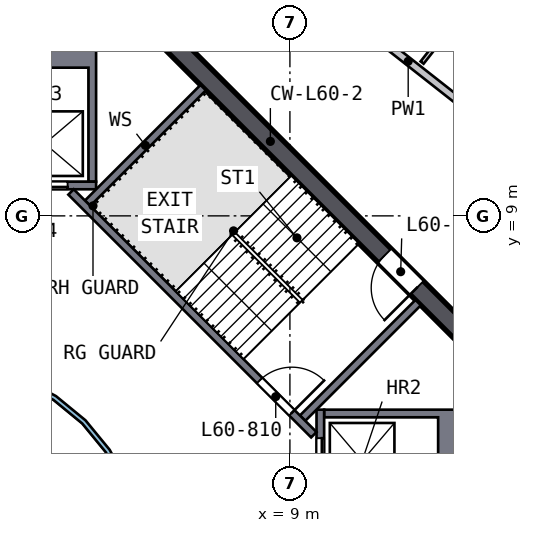
"""IFC4 building model, lengths in metres.
Left out: names, types, materials, properties, quantities, classifications, styles, units other than length and angle.
Written with IfcOpenShell. Run it as: python <this file> out.ifc"""

import sys

from ifc_helpers import new_model, si_unit, direction, frame, frame_2d, origin, place, context, subcontext, project, spatial, polyline, rectangle, outline, extrude, element, fill, save


model = new_model("IFC4")
c1 = context("Model", 3, precision=1e-05, world=origin(), true_north=direction((0.0, 1.0)))
c2 = subcontext(c1, "Body", "Model", "MODEL_VIEW")
j1 = project(units=[si_unit("LENGTHUNIT", "METRE"), si_unit("PLANEANGLEUNIT", "RADIAN")], contexts=[c1])
p1 = place(None, origin())
s1 = spatial("IfcSite", under=j1, at=p1, CompositionType="ELEMENT")
p2 = place(p1, origin())
s2 = spatial("IfcBuilding", under=s1, at=p2, CompositionType="ELEMENT")
p3 = place(p2, frame((0.0, 0.0, 244.5)))
s3 = spatial("IfcBuildingStorey", under=s2, at=p3, CompositionType="ELEMENT", Elevation=244.5)
p4 = place(p3, frame((13.823, 5.622, 0.0), z_axis=(0.0, 0.0, 1.0), x_axis=(-0.707106781, 0.707106781, 0.0)))
e1 = element("IfcWall", 1, at=p4, inside=s3, PredefinedType="SHEAR", context=c2, shape_type="SweptSolid", body=[
    extrude(rectangle(XDim=11.598, YDim=0.5, at=frame_2d((5.799, 0.0))), origin(), (0.0, 0.0, 1.0), 3.5),
])
p5 = place(p4, frame((2.099, 0.0, 0.0)))
e2 = element("IfcOpeningElement", 2, at=p5, cuts=e1, PredefinedType="OPENING", context=c2, shape_type="SweptSolid", body=[
    extrude(rectangle(XDim=1.2, YDim=2.1, at=frame_2d((0.6, 1.05))), frame((0.0, 0.26, 0.0), z_axis=(0.0, -1.0, 0.0), x_axis=(1.0, 0.0, 0.0)), (0.0, 0.0, 1.0), 0.52),
])
p6 = place(p3, origin())
e3 = element("IfcWall", 3, at=p6, inside=s3, PredefinedType="SOLIDWALL", context=c2, shape_type="SweptSolid", body=[
    extrude(outline(polyline([(13.5, 3.9), (13.5, 1.2), (9.9, 1.2), (9.9, 1.4), (12.9, 1.4), (12.9, 3.7), (9.9, 3.7), (9.9, 3.9), (13.5, 3.9)])), origin(), (0.0, 0.0, 1.0), 3.19),
])
p7 = place(p3, frame((9.8, 1.2, 0.0), z_axis=(0.0, 0.0, 1.0), x_axis=(0.0, 1.0, 0.0)))
e4 = element("IfcWall", 4, at=p7, inside=s3, PredefinedType="SOLIDWALL", context=c2, shape_type="SweptSolid", body=[
    extrude(rectangle(XDim=2.7, YDim=0.2, at=frame_2d((1.35, 0.0))), origin(), (0.0, 0.0, 1.0), 3.19),
])
p8 = place(p7, frame((0.75, 0.0, 0.0)))
e5 = element("IfcOpeningElement", 5, at=p8, cuts=e4, PredefinedType="OPENING", context=c2, shape_type="SweptSolid", body=[
    extrude(rectangle(XDim=1.2, YDim=2.1, at=frame_2d((0.6, 1.05))), frame((0.0, 0.11, 0.0), z_axis=(0.0, -1.0, 0.0), x_axis=(1.0, 0.0, 0.0)), (0.0, 0.0, 1.0), 0.22),
])
p9 = place(p3, origin())
e6 = element("IfcWall", 6, at=p9, inside=s3, PredefinedType="SOLIDWALL", context=c2, shape_type="SweptSolid", body=[
    extrude(outline(polyline([(3.9, 9.9), (3.7, 9.9), (3.7, 12.9), (1.4, 12.9), (1.4, 9.9), (1.2, 9.9), (1.2, 13.5), (3.9, 13.5), (3.9, 9.9)])), origin(), (0.0, 0.0, 1.0), 3.19),
])
p10 = place(p3, frame((1.2, 9.8, 0.0), z_axis=(0.0, 0.0, 1.0), x_axis=(1.0, 0.0, 0.0)))
e7 = element("IfcWall", 7, at=p10, inside=s3, PredefinedType="SOLIDWALL", context=c2, shape_type="SweptSolid", body=[
    extrude(rectangle(XDim=2.7, YDim=0.2, at=frame_2d((1.35, 0.0))), origin(), (0.0, 0.0, 1.0), 3.19),
])
p11 = place(p10, frame((0.75, 0.0, 0.0)))
e8 = element("IfcOpeningElement", 8, at=p11, cuts=e7, PredefinedType="OPENING", context=c2, shape_type="SweptSolid", body=[
    extrude(rectangle(XDim=1.2, YDim=2.1, at=frame_2d((0.6, 1.05))), frame((0.0, 0.11, 0.0), z_axis=(0.0, -1.0, 0.0), x_axis=(1.0, 0.0, 0.0)), (0.0, 0.0, 1.0), 0.22),
])
p12 = place(p3, frame((3.24, 9.629, 0.0), z_axis=(0.0, 0.0, 1.0), x_axis=(0.707106781, -0.707106781, 0.0)))
e9 = element("IfcWall", 9, at=p12, inside=s3, PredefinedType="SOLIDWALL", context=c2, shape_type="SweptSolid", body=[
    extrude(rectangle(XDim=9.036, YDim=0.2, at=frame_2d((4.518, 0.0))), origin(), (0.0, 0.0, 1.0), 3.19),
])
p13 = place(p12, frame((7.018, 0.0, 0.0)))
e10 = element("IfcOpeningElement", 10, at=p13, cuts=e9, PredefinedType="OPENING", context=c2, shape_type="SweptSolid", body=[
    extrude(rectangle(XDim=1.2, YDim=2.1, at=frame_2d((0.6, 1.05))), frame((0.0, 0.11, 0.0), z_axis=(0.0, -1.0, 0.0), x_axis=(1.0, 0.0, 0.0)), (0.0, 0.0, 1.0), 0.22),
])
for number, where, z_axis, x_axis in (
    (11, (9.334, 3.677, 0.0), (0.0, 0.0, 1.0), (0.707, 0.707, 0.0)),
    (12, (3.677, 9.334, 0.0), (0.0, 0.0, 1.0), (0.707, 0.707, 0.0)),
):
    element("IfcWall", number, at=place(p3, frame(where, z_axis=z_axis, x_axis=x_axis)), inside=s3, PredefinedType="SOLIDWALL", context=c2, shape_type="SweptSolid", body=[
        extrude(rectangle(XDim=4.3, YDim=0.2, at=frame_2d((2.15, 0.0))), origin(), (0.0, 0.0, 1.0), 3.19),
    ])
p14 = place(p3, origin())
e13 = element("IfcWall", 13, at=p14, inside=s3, PredefinedType="SOLIDWALL", context=c2, shape_type="SweptSolid", body=[
    extrude(outline(polyline([(5.021, -0.999), (4.73, -1.959), (4.257, -2.844), (3.62, -3.62), (2.844, -4.257), (1.959, -4.73), (0.999, -5.021), (0.0, -5.12), (-0.999, -5.021), (-1.959, -4.73), (-2.844, -4.257), (-3.62, -3.62), (-4.257, -2.844), (-4.73, -1.959), (-5.021, -0.999), (-5.12, 0.0), (-5.021, 0.999), (-4.73, 1.959), (-4.257, 2.844), (-3.62, 3.62), (-2.844, 4.257), (-1.959, 4.73), (-0.999, 5.021), (0.0, 5.12), (0.999, 5.021), (1.959, 4.73), (2.844, 4.257), (3.62, 3.62), (4.257, 2.844), (4.73, 1.959), (5.021, 0.999), (5.12, 0.0), (5.021, -0.999)]), holes=[polyline([(4.904, 0.976), (4.619, 1.913), (4.157, 2.778), (3.535, 3.535), (2.778, 4.157), (1.913, 4.619), (0.976, 4.904), (0.0, 5.0), (-0.976, 4.904), (-1.913, 4.619), (-2.778, 4.157), (-3.535, 3.535), (-4.157, 2.778), (-4.619, 1.913), (-4.904, 0.976), (-5.0, 0.0), (-4.904, -0.976), (-4.619, -1.913), (-4.157, -2.778), (-3.535, -3.535), (-2.778, -4.157), (-1.913, -4.619), (-0.976, -4.904), (0.0, -5.0), (0.976, -4.904), (1.913, -4.619), (2.778, -4.157), (3.535, -3.535), (4.157, -2.778), (4.619, -1.913), (4.904, -0.976), (5.0, 0.0), (4.904, 0.976)])]), origin(), (0.0, 0.0, 1.0), 3.19),
])
p15 = place(p3, frame((7.231, 16.903, 0.0), z_axis=(0.0, 0.0, 1.0), x_axis=(0.786294696, -0.617851641, 0.0)))
e14 = element("IfcWall", 14, at=p15, inside=s3, PredefinedType="SOLIDWALL", context=c2, shape_type="SweptSolid", body=[
    extrude(rectangle(XDim=9.317, YDim=0.2, at=frame_2d((4.658, 0.0))), origin(), (0.0, 0.0, 1.0), 3.19),
])
p16 = place(p15, frame((1.9, 0.0, 0.0)))
e15 = element("IfcOpeningElement", 15, at=p16, cuts=e14, PredefinedType="OPENING", context=c2, shape_type="SweptSolid", body=[
    extrude(rectangle(XDim=1.0, YDim=2.1, at=frame_2d((0.5, 1.05))), frame((0.0, 0.11, 0.0), z_axis=(0.0, -1.0, 0.0), x_axis=(1.0, 0.0, 0.0)), (0.0, 0.0, 1.0), 0.22),
])
p17 = place(p3, frame((14.394, 15.471, 0.0), z_axis=(0.0, 0.0, 1.0), x_axis=(-0.617842421, -0.786301941, 0.0)))
e16 = element("IfcWall", 16, at=p17, inside=s3, PredefinedType="PARTITIONING", context=c2, shape_type="SweptSolid", body=[
    extrude(rectangle(XDim=3.1, YDim=0.1, at=frame_2d((1.55, 0.0))), origin(), (0.0, 0.0, 1.0), 3.19),
])
p18 = place(p17, frame((1.15, 0.0, 0.0)))
e17 = element("IfcOpeningElement", 17, at=p18, cuts=e16, PredefinedType="OPENING", context=c2, shape_type="SweptSolid", body=[
    extrude(rectangle(XDim=0.9, YDim=2.1, at=frame_2d((0.45, 1.05))), frame((0.0, 0.06, 0.0), z_axis=(0.0, -1.0, 0.0), x_axis=(1.0, 0.0, 0.0)), (0.0, 0.0, 1.0), 0.12),
])
p19 = place(p8, origin())
e18 = element("IfcDoor", 18, at=p19, inside=s3, OperationType="DOUBLE_DOOR_SLIDING", PredefinedType="DOOR", context=c2, shape_type="SweptSolid", body=[
    extrude(rectangle(XDim=1.2, YDim=2.1, at=frame_2d((0.6, 1.05))), frame((0.0, 0.025, 0.0), z_axis=(0.0, -1.0, 0.0), x_axis=(1.0, 0.0, 0.0)), (0.0, 0.0, 1.0), 0.05),
])
fill(e5, e18)
p20 = place(p11, origin())
e19 = element("IfcDoor", 19, at=p20, inside=s3, OperationType="DOUBLE_DOOR_SLIDING", PredefinedType="DOOR", context=c2, shape_type="SweptSolid", body=[
    extrude(rectangle(XDim=1.2, YDim=2.1, at=frame_2d((0.6, 1.05))), frame((0.0, 0.025, 0.0), z_axis=(0.0, -1.0, 0.0), x_axis=(1.0, 0.0, 0.0)), (0.0, 0.0, 1.0), 0.05),
])
fill(e8, e19)
p21 = place(p13, origin())
e20 = element("IfcDoor", 20, at=p21, inside=s3, OperationType="SINGLE_SWING_RIGHT", PredefinedType="DOOR", context=c2, shape_type="SweptSolid", body=[
    extrude(rectangle(XDim=1.2, YDim=2.1, at=frame_2d((0.6, 1.05))), frame((0.0, 0.025, 0.0), z_axis=(0.0, -1.0, 0.0), x_axis=(1.0, 0.0, 0.0)), (0.0, 0.0, 1.0), 0.05),
])
fill(e10, e20)
p22 = place(p5, origin())
e21 = element("IfcDoor", 21, at=p22, inside=s3, OperationType="SINGLE_SWING_LEFT", PredefinedType="DOOR", context=c2, shape_type="SweptSolid", body=[
    extrude(rectangle(XDim=1.2, YDim=2.1, at=frame_2d((0.6, 1.05))), frame((0.0, 0.025, 0.0), z_axis=(0.0, -1.0, 0.0), x_axis=(1.0, 0.0, 0.0)), (0.0, 0.0, 1.0), 0.05),
])
fill(e2, e21)
save(model, sys.argv[1])
